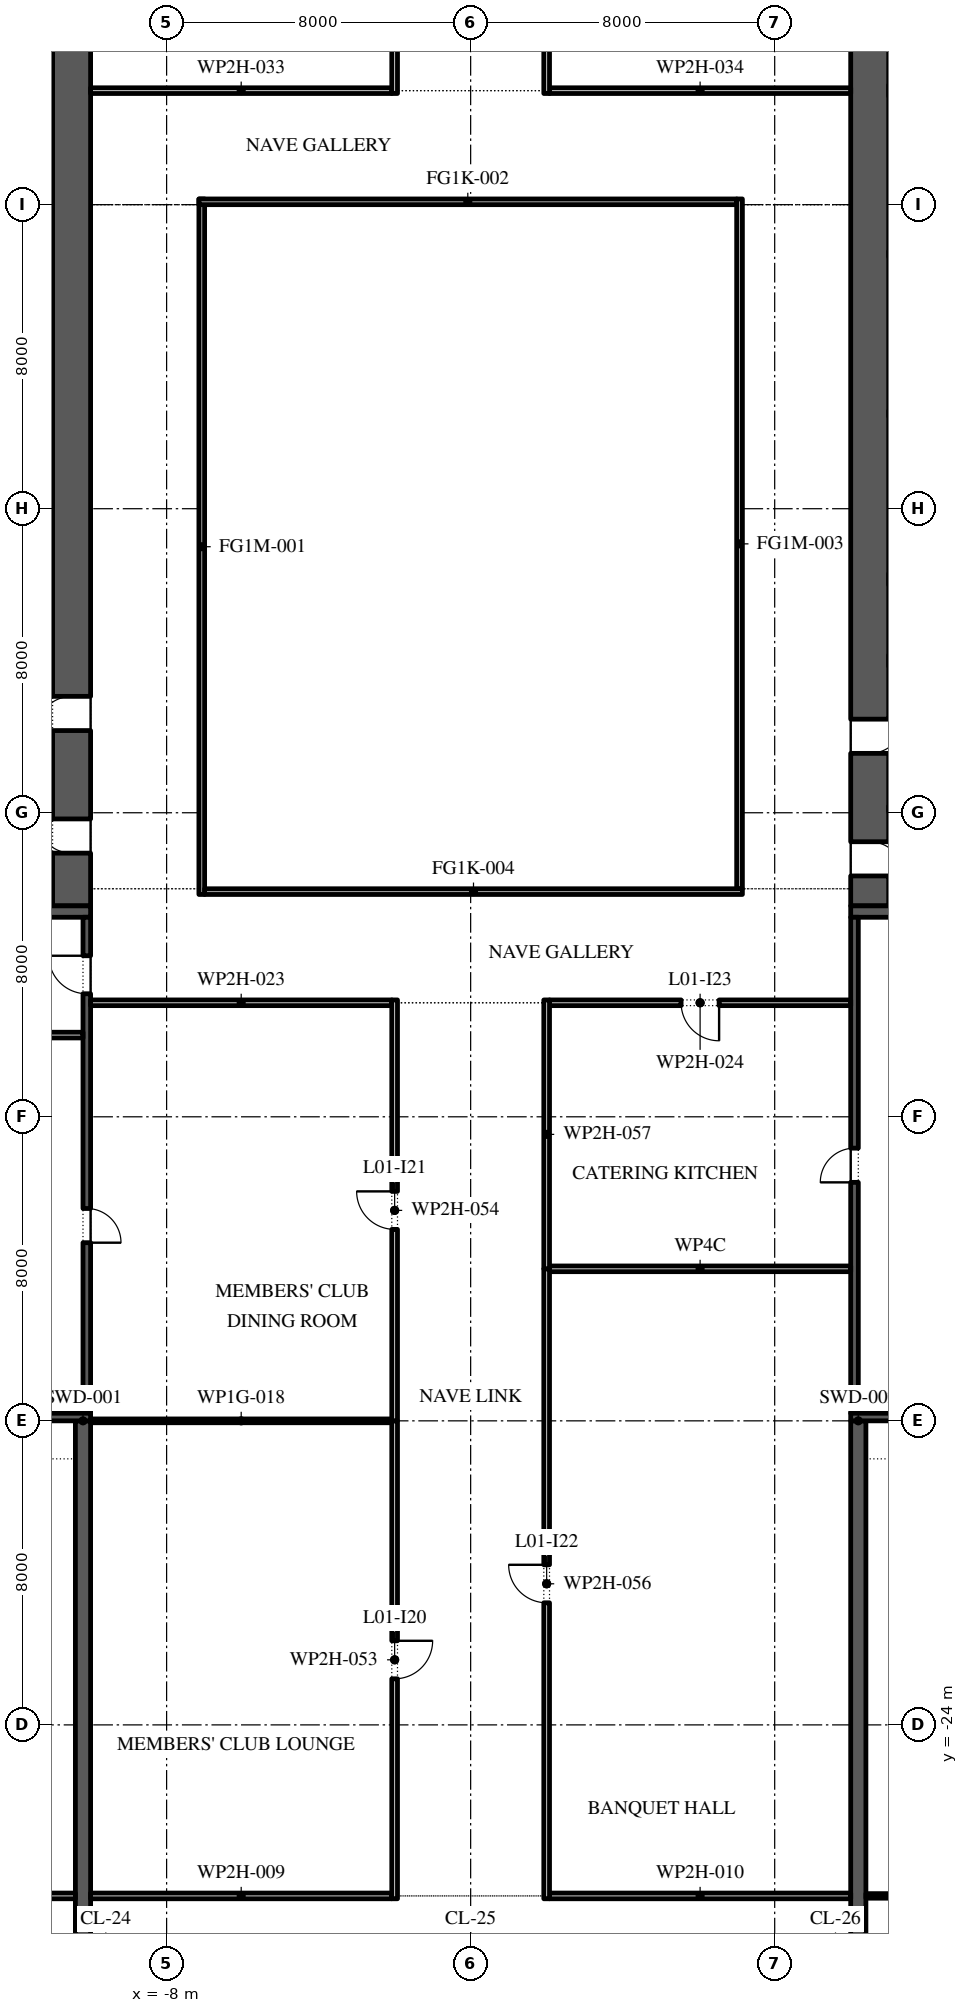
"""IFC4 building model, lengths in metres.
Left out: names, types, materials, properties, quantities, classifications, styles, units other than length and angle.
Written with IfcOpenShell. Run it as: python <this file> out.ifc"""

import sys

from ifc_helpers import new_model, si_unit, direction, frame, frame_2d, origin, place, context, subcontext, project, spatial, rectangle, extrude, element, fill, save


model = new_model("IFC4")
c1 = context("Model", 3, precision=1e-05, world=origin(), true_north=direction((0.0, 1.0)))
c2 = subcontext(c1, "Body", "Model", "MODEL_VIEW")
j1 = project(units=[si_unit("LENGTHUNIT", "METRE"), si_unit("PLANEANGLEUNIT", "RADIAN")], contexts=[c1])
p1 = place(None, origin())
s1 = spatial("IfcSite", under=j1, at=p1, CompositionType="ELEMENT")
p2 = place(p1, origin())
s2 = spatial("IfcBuilding", under=s1, at=p2, CompositionType="ELEMENT")
p3 = place(p2, frame((0.0, 0.0, 8.0)))
s3 = spatial("IfcBuildingStorey", under=s2, at=p3, CompositionType="ELEMENT", Elevation=8.0)
for number, where, z_axis, x_axis in (
    (1, (-10.2, -31.0, 0.0), (0.0, 0.0, 1.0), (0.0, 1.0, 0.0)),
    (2, (10.2, -31.0, 0.0), (0.0, 0.0, 1.0), (0.0, 1.0, 0.0)),
):
    element("IfcWall", number, at=place(p3, frame(where, z_axis=z_axis, x_axis=x_axis)), inside=s3, PredefinedType="SHEAR", context=c2, shape_type="SweptSolid", body=[
        extrude(rectangle(XDim=15.0, YDim=0.4, at=frame_2d((7.5, 0.0))), origin(), (0.0, 0.0, 1.0), 5.7),
    ])
p4 = place(p3, frame((-7.075, -2.15, 0.0), z_axis=(0.0, 0.0, 1.0), x_axis=(0.0, 1.0, 0.0)))
e3 = element("IfcWall", 3, at=p4, inside=s3, PredefinedType="STANDARD", context=c2, shape_type="SweptSolid", body=[
    extrude(rectangle(XDim=18.3, YDim=0.15, at=frame_2d((9.15, 0.0))), origin(), (0.0, 0.0, 1.0), 5.7),
])
p5 = place(p3, frame((-7.15, 16.075, 0.0), z_axis=(0.0, 0.0, 1.0), x_axis=(1.0, 0.0, 0.0)))
e4 = element("IfcWall", 4, at=p5, inside=s3, PredefinedType="STANDARD", context=c2, shape_type="SweptSolid", body=[
    extrude(rectangle(XDim=14.15, YDim=0.15, at=frame_2d((7.075, 0.0))), origin(), (0.0, 0.0, 1.0), 4.72),
])
p6 = place(p3, frame((7.075, 16.15, 0.0), z_axis=(0.0, 0.0, 1.0), x_axis=(0.0, -1.0, 0.0)))
e5 = element("IfcWall", 5, at=p6, inside=s3, PredefinedType="STANDARD", context=c2, shape_type="SweptSolid", body=[
    extrude(rectangle(XDim=18.15, YDim=0.15, at=frame_2d((9.075, 0.0))), origin(), (0.0, 0.0, 1.0), 5.7),
])
p7 = place(p3, frame((7.15, -2.075, 0.0), z_axis=(0.0, 0.0, 1.0), x_axis=(-1.0, 0.0, 0.0)))
e6 = element("IfcWall", 6, at=p7, inside=s3, PredefinedType="STANDARD", context=c2, shape_type="SweptSolid", body=[
    extrude(rectangle(XDim=14.15, YDim=0.15, at=frame_2d((7.075, 0.0))), origin(), (0.0, 0.0, 1.0), 4.72),
])
p8 = place(p3, frame((-10.5, -2.45, 0.0), z_axis=(0.0, 0.0, 1.0), x_axis=(0.0, 1.0, 0.0)))
e7 = element("IfcWall", 7, at=p8, inside=s3, PredefinedType="SHEAR", context=c2, shape_type="SweptSolid", body=[
    extrude(rectangle(XDim=27.9, YDim=1.0, at=frame_2d((13.95, 0.0))), origin(), (0.0, 0.0, 1.0), 5.7),
])
p9 = place(p8, frame((23.65, 0.0, 0.0)))
e8 = element("IfcOpeningElement", 8, at=p9, cuts=e7, PredefinedType="OPENING", context=c2, shape_type="SweptSolid", body=[
    extrude(rectangle(XDim=2.4, YDim=2.1, at=frame_2d((1.2, 1.05))), frame((0.0, 0.51, 0.0), z_axis=(0.0, -1.0, 0.0), x_axis=(1.0, 0.0, 0.0)), (0.0, 0.0, 1.0), 1.02),
])
p10 = place(p8, frame((1.387, 0.0, 0.0)))
e9 = element("IfcOpeningElement", 9, at=p10, cuts=e7, PredefinedType="OPENING", context=c2, shape_type="SweptSolid", body=[
    extrude(rectangle(XDim=0.9, YDim=2.1, at=frame_2d((0.45, 1.05))), frame((0.0, 0.51, 0.0), z_axis=(0.0, -1.0, 0.0), x_axis=(1.0, 0.0, 0.0)), (0.0, 0.0, 1.0), 1.02),
])
p11 = place(p8, frame((4.613, 0.0, 0.0)))
e10 = element("IfcOpeningElement", 10, at=p11, cuts=e7, PredefinedType="OPENING", context=c2, shape_type="SweptSolid", body=[
    extrude(rectangle(XDim=0.9, YDim=2.1, at=frame_2d((0.45, 1.05))), frame((0.0, 0.51, 0.0), z_axis=(0.0, -1.0, 0.0), x_axis=(1.0, 0.0, 0.0)), (0.0, 0.0, 1.0), 1.02),
])
p12 = place(p3, frame((-22.0, -2.6, 0.0), z_axis=(0.0, 0.0, 1.0), x_axis=(1.0, 0.0, 0.0)))
e11 = element("IfcWall", 11, at=p12, inside=s3, PredefinedType="SHEAR", context=c2, shape_type="SweptSolid", body=[
    extrude(rectangle(XDim=12.0, YDim=0.3, at=frame_2d((6.0, 0.0))), origin(), (0.0, 0.0, 1.0), 5.7),
])
p13 = place(p3, frame((-10.1, -15.8, 0.0), z_axis=(0.0, 0.0, 1.0), x_axis=(0.0, 1.0, 0.0)))
e12 = element("IfcWall", 12, at=p13, inside=s3, PredefinedType="SHEAR", context=c2, shape_type="SweptSolid", body=[
    extrude(rectangle(XDim=13.05, YDim=0.2, at=frame_2d((6.525, 0.0))), origin(), (0.0, 0.0, 1.0), 5.7),
])
p14 = place(p13, frame((4.488, 0.0, 0.0)))
e13 = element("IfcOpeningElement", 13, at=p14, cuts=e12, PredefinedType="OPENING", context=c2, shape_type="SweptSolid", body=[
    extrude(rectangle(XDim=0.9, YDim=2.1, at=frame_2d((0.45, 1.05))), frame((0.0, 0.11, 0.0), z_axis=(0.0, -1.0, 0.0), x_axis=(1.0, 0.0, 0.0)), (0.0, 0.0, 1.0), 0.22),
])
p15 = place(p13, frame((11.038, 0.0, 0.0)))
e14 = element("IfcOpeningElement", 14, at=p15, cuts=e12, PredefinedType="OPENING", context=c2, shape_type="SweptSolid", body=[
    extrude(rectangle(XDim=1.0, YDim=2.1, at=frame_2d((0.5, 1.05))), frame((0.0, 0.11, 0.0), z_axis=(0.0, -1.0, 0.0), x_axis=(1.0, 0.0, 0.0)), (0.0, 0.0, 1.0), 0.22),
])
p16 = place(p3, frame((-22.0, -15.9, 0.0), z_axis=(0.0, 0.0, 1.0), x_axis=(1.0, 0.0, 0.0)))
e15 = element("IfcWall", 15, at=p16, inside=s3, PredefinedType="SHEAR", context=c2, shape_type="SweptSolid", body=[
    extrude(rectangle(XDim=12.0, YDim=0.2, at=frame_2d((6.0, 0.0))), origin(), (0.0, 0.0, 1.0), 5.7),
])
p17 = place(p3, frame((-21.8, -5.85, 0.0), z_axis=(0.0, 0.0, 1.0), x_axis=(1.0, 0.0, 0.0)))
e16 = element("IfcWall", 16, at=p17, inside=s3, PredefinedType="PARTITIONING", context=c2, shape_type="SweptSolid", body=[
    extrude(rectangle(XDim=11.6, YDim=0.15, at=frame_2d((5.8, 0.0))), origin(), (0.0, 0.0, 1.0), 5.7),
])
p18 = place(p3, frame((10.5, -2.45, 0.0), z_axis=(0.0, 0.0, 1.0), x_axis=(0.0, 1.0, 0.0)))
e17 = element("IfcWall", 17, at=p18, inside=s3, PredefinedType="SHEAR", context=c2, shape_type="SweptSolid", body=[
    extrude(rectangle(XDim=27.9, YDim=1.0, at=frame_2d((13.95, 0.0))), origin(), (0.0, 0.0, 1.0), 5.7),
])
p19 = place(p18, frame((23.65, 0.0, 0.0)))
e18 = element("IfcOpeningElement", 18, at=p19, cuts=e17, PredefinedType="OPENING", context=c2, shape_type="SweptSolid", body=[
    extrude(rectangle(XDim=2.4, YDim=2.1, at=frame_2d((1.2, 1.05))), frame((0.0, 0.51, 0.0), z_axis=(0.0, -1.0, 0.0), x_axis=(1.0, 0.0, 0.0)), (0.0, 0.0, 1.0), 1.02),
])
p20 = place(p18, frame((0.788, 0.0, 0.0)))
e19 = element("IfcOpeningElement", 19, at=p20, cuts=e17, PredefinedType="OPENING", context=c2, shape_type="SweptSolid", body=[
    extrude(rectangle(XDim=0.9, YDim=2.1, at=frame_2d((0.45, 1.05))), frame((0.0, 0.51, 0.0), z_axis=(0.0, -1.0, 0.0), x_axis=(1.0, 0.0, 0.0)), (0.0, 0.0, 1.0), 1.02),
])
p21 = place(p18, frame((4.012, 0.0, 0.0)))
e20 = element("IfcOpeningElement", 20, at=p21, cuts=e17, PredefinedType="OPENING", context=c2, shape_type="SweptSolid", body=[
    extrude(rectangle(XDim=0.9, YDim=2.1, at=frame_2d((0.45, 1.05))), frame((0.0, 0.51, 0.0), z_axis=(0.0, -1.0, 0.0), x_axis=(1.0, 0.0, 0.0)), (0.0, 0.0, 1.0), 1.02),
])
p22 = place(p3, frame((10.0, -2.6, 0.0), z_axis=(0.0, 0.0, 1.0), x_axis=(1.0, 0.0, 0.0)))
e21 = element("IfcWall", 21, at=p22, inside=s3, PredefinedType="SHEAR", context=c2, shape_type="SweptSolid", body=[
    extrude(rectangle(XDim=12.0, YDim=0.3, at=frame_2d((6.0, 0.0))), origin(), (0.0, 0.0, 1.0), 5.7),
])
p23 = place(p3, frame((10.1, -15.8, 0.0), z_axis=(0.0, 0.0, 1.0), x_axis=(0.0, 1.0, 0.0)))
e22 = element("IfcWall", 22, at=p23, inside=s3, PredefinedType="SHEAR", context=c2, shape_type="SweptSolid", body=[
    extrude(rectangle(XDim=13.05, YDim=0.2, at=frame_2d((6.525, 0.0))), origin(), (0.0, 0.0, 1.0), 5.7),
])
p24 = place(p23, frame((6.075, 0.0, 0.0)))
e23 = element("IfcOpeningElement", 23, at=p24, cuts=e22, PredefinedType="OPENING", context=c2, shape_type="SweptSolid", body=[
    extrude(rectangle(XDim=0.9, YDim=2.1, at=frame_2d((0.45, 1.05))), frame((0.0, 0.11, 0.0), z_axis=(0.0, -1.0, 0.0), x_axis=(1.0, 0.0, 0.0)), (0.0, 0.0, 1.0), 0.22),
])
p25 = place(p3, frame((10.0, -15.9, 0.0), z_axis=(0.0, 0.0, 1.0), x_axis=(1.0, 0.0, 0.0)))
e24 = element("IfcWall", 24, at=p25, inside=s3, PredefinedType="SHEAR", context=c2, shape_type="SweptSolid", body=[
    extrude(rectangle(XDim=12.0, YDim=0.2, at=frame_2d((6.0, 0.0))), origin(), (0.0, 0.0, 1.0), 5.7),
])
p26 = place(p3, frame((-21.925, -28.5, 0.0), z_axis=(0.0, 0.0, 1.0), x_axis=(1.0, 0.0, 0.0)))
e25 = element("IfcWall", 25, at=p26, inside=s3, PredefinedType="PARTITIONING", context=c2, shape_type="SweptSolid", body=[
    extrude(rectangle(XDim=11.525, YDim=0.15, at=frame_2d((5.763, 0.0))), origin(), (0.0, 0.0, 1.0), 5.7),
])
for number, where, z_axis, x_axis in (
    (26, (-10.0, -28.5, 0.0), (0.0, 0.0, 1.0), (1.0, 0.0, 0.0)),
    (27, (2.075, -28.5, 0.0), (0.0, 0.0, 1.0), (1.0, 0.0, 0.0)),
):
    element("IfcWall", number, at=place(p3, frame(where, z_axis=z_axis, x_axis=x_axis)), inside=s3, PredefinedType="PARTITIONING", context=c2, shape_type="SweptSolid", body=[
        extrude(rectangle(XDim=7.925, YDim=0.15, at=frame_2d((3.962, 0.0))), origin(), (0.0, 0.0, 1.0), 5.7),
    ])
p27 = place(p3, frame((10.4, -28.5, 0.0), z_axis=(0.0, 0.0, 1.0), x_axis=(1.0, 0.0, 0.0)))
e28 = element("IfcWall", 28, at=p27, inside=s3, PredefinedType="PARTITIONING", context=c2, shape_type="SweptSolid", body=[
    extrude(rectangle(XDim=11.54, YDim=0.12, at=frame_2d((5.77, 0.0))), origin(), (0.0, 0.0, 1.0), 5.7),
])
p28 = place(p3, frame((-10.0, -16.0, 0.0), z_axis=(0.0, 0.0, 1.0), x_axis=(1.0, 0.0, 0.0)))
e29 = element("IfcWall", 29, at=p28, inside=s3, PredefinedType="PARTITIONING", context=c2, shape_type="SweptSolid", body=[
    extrude(rectangle(XDim=7.925, YDim=0.1, at=frame_2d((3.962, 0.0))), origin(), (0.0, 0.0, 1.0), 5.7),
])
for number, where, z_axis, x_axis in (
    (30, (2.075, -12.0, 0.0), (0.0, 0.0, 1.0), (1.0, 0.0, 0.0)),
    (31, (-10.0, -5.0, 0.0), (0.0, 0.0, 1.0), (1.0, 0.0, 0.0)),
):
    element("IfcWall", number, at=place(p3, frame(where, z_axis=z_axis, x_axis=x_axis)), inside=s3, PredefinedType="PARTITIONING", context=c2, shape_type="SweptSolid", body=[
        extrude(rectangle(XDim=7.925, YDim=0.15, at=frame_2d((3.962, 0.0))), origin(), (0.0, 0.0, 1.0), 5.7),
    ])
p29 = place(p3, frame((2.075, -5.0, 0.0), z_axis=(0.0, 0.0, 1.0), x_axis=(1.0, 0.0, 0.0)))
e32 = element("IfcWall", 32, at=p29, inside=s3, PredefinedType="PARTITIONING", context=c2, shape_type="SweptSolid", body=[
    extrude(rectangle(XDim=7.925, YDim=0.15, at=frame_2d((3.962, 0.0))), origin(), (0.0, 0.0, 1.0), 5.7),
])
p30 = place(p29, frame((3.462, 0.0, 0.0)))
e33 = element("IfcOpeningElement", 33, at=p30, cuts=e32, PredefinedType="OPENING", context=c2, shape_type="SweptSolid", body=[
    extrude(rectangle(XDim=1.0, YDim=2.1, at=frame_2d((0.5, 1.05))), frame((0.0, 0.085, 0.0), z_axis=(0.0, -1.0, 0.0), x_axis=(1.0, 0.0, 0.0)), (0.0, 0.0, 1.0), 0.17),
])
for number, where, z_axis, x_axis in (
    (34, (-10.0, 19.0, 0.0), (0.0, 0.0, 1.0), (1.0, 0.0, 0.0)),
    (35, (2.075, 19.0, 0.0), (0.0, 0.0, 1.0), (1.0, 0.0, 0.0)),
):
    element("IfcWall", number, at=place(p3, frame(where, z_axis=z_axis, x_axis=x_axis)), inside=s3, PredefinedType="PARTITIONING", context=c2, shape_type="SweptSolid", body=[
        extrude(rectangle(XDim=7.925, YDim=0.15, at=frame_2d((3.962, 0.0))), origin(), (0.0, 0.0, 1.0), 5.7),
    ])
p31 = place(p3, frame((-2.0, -28.575, 0.0), z_axis=(0.0, 0.0, 1.0), x_axis=(0.0, 1.0, 0.0)))
e36 = element("IfcWall", 36, at=p31, inside=s3, PredefinedType="PARTITIONING", context=c2, shape_type="SweptSolid", body=[
    extrude(rectangle(XDim=12.575, YDim=0.15, at=frame_2d((6.288, 0.0))), origin(), (0.0, 0.0, 1.0), 5.7),
])
p32 = place(p31, frame((5.788, 0.0, 0.0)))
e37 = element("IfcOpeningElement", 37, at=p32, cuts=e36, PredefinedType="OPENING", context=c2, shape_type="SweptSolid", body=[
    extrude(rectangle(XDim=1.0, YDim=2.1, at=frame_2d((0.5, 1.05))), frame((0.0, 0.085, 0.0), z_axis=(0.0, -1.0, 0.0), x_axis=(1.0, 0.0, 0.0)), (0.0, 0.0, 1.0), 0.17),
])
p33 = place(p3, frame((-2.0, -16.0, 0.0), z_axis=(0.0, 0.0, 1.0), x_axis=(0.0, 1.0, 0.0)))
e38 = element("IfcWall", 38, at=p33, inside=s3, PredefinedType="PARTITIONING", context=c2, shape_type="SweptSolid", body=[
    extrude(rectangle(XDim=11.075, YDim=0.15, at=frame_2d((5.538, 0.0))), origin(), (0.0, 0.0, 1.0), 5.7),
])
p34 = place(p33, frame((5.038, 0.0, 0.0)))
e39 = element("IfcOpeningElement", 39, at=p34, cuts=e38, PredefinedType="OPENING", context=c2, shape_type="SweptSolid", body=[
    extrude(rectangle(XDim=1.0, YDim=2.1, at=frame_2d((0.5, 1.05))), frame((0.0, 0.085, 0.0), z_axis=(0.0, -1.0, 0.0), x_axis=(1.0, 0.0, 0.0)), (0.0, 0.0, 1.0), 0.17),
])
p35 = place(p3, frame((-2.0, 18.925, 0.0), z_axis=(0.0, 0.0, 1.0), x_axis=(0.0, 1.0, 0.0)))
e40 = element("IfcWall", 40, at=p35, inside=s3, PredefinedType="PARTITIONING", context=c2, shape_type="SweptSolid", body=[
    extrude(rectangle(XDim=6.55, YDim=0.15, at=frame_2d((3.275, 0.0))), origin(), (0.0, 0.0, 1.0), 5.7),
])
p36 = place(p3, frame((2.0, -28.575, 0.0), z_axis=(0.0, 0.0, 1.0), x_axis=(0.0, 1.0, 0.0)))
e41 = element("IfcWall", 41, at=p36, inside=s3, PredefinedType="PARTITIONING", context=c2, shape_type="SweptSolid", body=[
    extrude(rectangle(XDim=16.575, YDim=0.15, at=frame_2d((8.288, 0.0))), origin(), (0.0, 0.0, 1.0), 5.7),
])
p37 = place(p36, frame((7.788, 0.0, 0.0)))
e42 = element("IfcOpeningElement", 42, at=p37, cuts=e41, PredefinedType="OPENING", context=c2, shape_type="SweptSolid", body=[
    extrude(rectangle(XDim=1.0, YDim=2.1, at=frame_2d((0.5, 1.05))), frame((0.0, 0.085, 0.0), z_axis=(0.0, -1.0, 0.0), x_axis=(1.0, 0.0, 0.0)), (0.0, 0.0, 1.0), 0.17),
])
p38 = place(p3, frame((2.0, -12.0, 0.0), z_axis=(0.0, 0.0, 1.0), x_axis=(0.0, 1.0, 0.0)))
e43 = element("IfcWall", 43, at=p38, inside=s3, PredefinedType="PARTITIONING", context=c2, shape_type="SweptSolid", body=[
    extrude(rectangle(XDim=7.075, YDim=0.15, at=frame_2d((3.538, 0.0))), origin(), (0.0, 0.0, 1.0), 5.7),
])
p39 = place(p3, frame((2.0, 18.925, 0.0), z_axis=(0.0, 0.0, 1.0), x_axis=(0.0, 1.0, 0.0)))
e44 = element("IfcWall", 44, at=p39, inside=s3, PredefinedType="PARTITIONING", context=c2, shape_type="SweptSolid", body=[
    extrude(rectangle(XDim=6.55, YDim=0.15, at=frame_2d((3.275, 0.0))), origin(), (0.0, 0.0, 1.0), 5.7),
])
p40 = place(p10, origin())
e45 = element("IfcDoor", 45, at=p40, inside=s3, OperationType="SINGLE_SWING_LEFT", PredefinedType="DOOR", context=c2, shape_type="SweptSolid", body=[
    extrude(rectangle(XDim=0.9, YDim=2.1, at=frame_2d((0.45, 1.05))), frame((0.0, 0.5, 0.0), z_axis=(0.0, -1.0, 0.0), x_axis=(1.0, 0.0, 0.0)), (0.0, 0.0, 1.0), 0.05),
])
fill(e9, e45)
p41 = place(p11, origin())
e46 = element("IfcDoor", 46, at=p41, inside=s3, OperationType="SINGLE_SWING_RIGHT", PredefinedType="DOOR", context=c2, shape_type="SweptSolid", body=[
    extrude(rectangle(XDim=0.9, YDim=2.1, at=frame_2d((0.45, 1.05))), frame((0.0, 0.5, 0.0), z_axis=(0.0, -1.0, 0.0), x_axis=(1.0, 0.0, 0.0)), (0.0, 0.0, 1.0), 0.05),
])
fill(e10, e46)
p42 = place(p14, frame((0.9, 0.15, 0.0), z_axis=(0.0, 0.0, 1.0), x_axis=(-1.0, 0.0, 0.0)))
e47 = element("IfcDoor", 47, at=p42, inside=s3, OperationType="SINGLE_SWING_LEFT", PredefinedType="DOOR", context=c2, shape_type="SweptSolid", body=[
    extrude(rectangle(XDim=0.9, YDim=2.1, at=frame_2d((0.45, 1.05))), frame((0.0, 0.1, 0.0), z_axis=(0.0, -1.0, 0.0), x_axis=(1.0, 0.0, 0.0)), (0.0, 0.0, 1.0), 0.05),
])
fill(e13, e47)
p43 = place(p15, origin())
e48 = element("IfcDoor", 48, at=p43, inside=s3, OperationType="SINGLE_SWING_LEFT", PredefinedType="DOOR", context=c2, shape_type="SweptSolid", body=[
    extrude(rectangle(XDim=1.0, YDim=2.1, at=frame_2d((0.5, 1.05))), frame((0.0, 0.1, 0.0), z_axis=(0.0, -1.0, 0.0), x_axis=(1.0, 0.0, 0.0)), (0.0, 0.0, 1.0), 0.05),
])
fill(e14, e48)
p44 = place(p20, frame((0.9, -0.95, 0.0), z_axis=(0.0, 0.0, 1.0), x_axis=(-1.0, 0.0, 0.0)))
e49 = element("IfcDoor", 49, at=p44, inside=s3, OperationType="SINGLE_SWING_LEFT", PredefinedType="DOOR", context=c2, shape_type="SweptSolid", body=[
    extrude(rectangle(XDim=0.9, YDim=2.1, at=frame_2d((0.45, 1.05))), frame((0.0, -0.45, 0.0), z_axis=(0.0, -1.0, 0.0), x_axis=(1.0, 0.0, 0.0)), (0.0, 0.0, 1.0), 0.05),
])
fill(e19, e49)
p45 = place(p21, frame((0.9, -0.95, 0.0), z_axis=(0.0, 0.0, 1.0), x_axis=(-1.0, 0.0, 0.0)))
e50 = element("IfcDoor", 50, at=p45, inside=s3, OperationType="SINGLE_SWING_RIGHT", PredefinedType="DOOR", context=c2, shape_type="SweptSolid", body=[
    extrude(rectangle(XDim=0.9, YDim=2.1, at=frame_2d((0.45, 1.05))), frame((0.0, -0.45, 0.0), z_axis=(0.0, -1.0, 0.0), x_axis=(1.0, 0.0, 0.0)), (0.0, 0.0, 1.0), 0.05),
])
fill(e20, e50)
p46 = place(p24, origin())
e51 = element("IfcDoor", 51, at=p46, inside=s3, OperationType="SINGLE_SWING_RIGHT", PredefinedType="DOOR", context=c2, shape_type="SweptSolid", body=[
    extrude(rectangle(XDim=0.9, YDim=2.1, at=frame_2d((0.45, 1.05))), frame((0.0, -0.05, 0.0), z_axis=(0.0, -1.0, 0.0), x_axis=(1.0, 0.0, 0.0)), (0.0, 0.0, 1.0), 0.05),
])
fill(e23, e51)
p47 = place(p32, frame((1.0, 0.0, 0.0), z_axis=(0.0, 0.0, 1.0), x_axis=(-1.0, 0.0, 0.0)))
e52 = element("IfcDoor", 52, at=p47, inside=s3, OperationType="SINGLE_SWING_RIGHT", PredefinedType="DOOR", context=c2, shape_type="SweptSolid", body=[
    extrude(rectangle(XDim=1.0, YDim=2.1, at=frame_2d((0.5, 1.05))), frame((0.0, 0.025, 0.0), z_axis=(0.0, -1.0, 0.0), x_axis=(1.0, 0.0, 0.0)), (0.0, 0.0, 1.0), 0.05),
])
fill(e37, e52)
p48 = place(p34, origin())
e53 = element("IfcDoor", 53, at=p48, inside=s3, OperationType="SINGLE_SWING_LEFT", PredefinedType="DOOR", context=c2, shape_type="SweptSolid", body=[
    extrude(rectangle(XDim=1.0, YDim=2.1, at=frame_2d((0.5, 1.05))), frame((0.0, 0.025, 0.0), z_axis=(0.0, -1.0, 0.0), x_axis=(1.0, 0.0, 0.0)), (0.0, 0.0, 1.0), 0.05),
])
fill(e39, e53)
p49 = place(p37, origin())
e54 = element("IfcDoor", 54, at=p49, inside=s3, OperationType="SINGLE_SWING_LEFT", PredefinedType="DOOR", context=c2, shape_type="SweptSolid", body=[
    extrude(rectangle(XDim=1.0, YDim=2.1, at=frame_2d((0.5, 1.05))), frame((0.0, 0.025, 0.0), z_axis=(0.0, -1.0, 0.0), x_axis=(1.0, 0.0, 0.0)), (0.0, 0.0, 1.0), 0.05),
])
fill(e42, e54)
p50 = place(p30, frame((1.0, 0.0, 0.0), z_axis=(0.0, 0.0, 1.0), x_axis=(-1.0, 0.0, 0.0)))
e55 = element("IfcDoor", 55, at=p50, inside=s3, OperationType="SINGLE_SWING_RIGHT", PredefinedType="DOOR", context=c2, shape_type="SweptSolid", body=[
    extrude(rectangle(XDim=1.0, YDim=2.1, at=frame_2d((0.5, 1.05))), frame((0.0, 0.025, 0.0), z_axis=(0.0, -1.0, 0.0), x_axis=(1.0, 0.0, 0.0)), (0.0, 0.0, 1.0), 0.05),
])
fill(e33, e55)
save(model, sys.argv[1])
